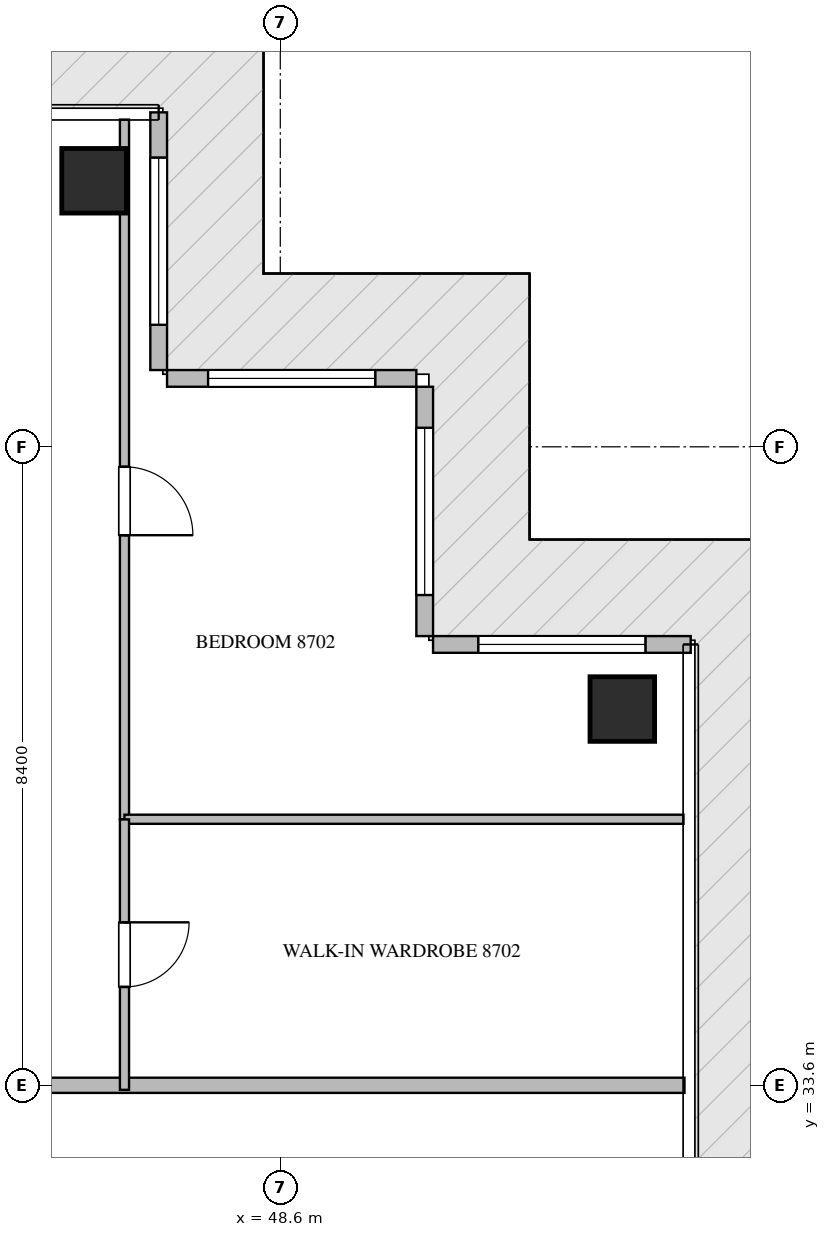
"""IFC4 building model, lengths in metres.
Left out: names, types, materials, properties, quantities, classifications, styles, units other than length and angle.
Written with IfcOpenShell. Run it as: python <this file> out.ifc"""

import sys

from ifc_helpers import new_model, si_unit, direction, frame, frame_2d, origin, origin_2d, place, context, subcontext, project, spatial, rectangle, extrude, source, transform, mapped, element, fill, save


model = new_model("IFC4")
c1 = context("Model", 3, precision=1e-05, world=origin(), true_north=direction((0.0, 1.0)))
c2 = subcontext(c1, "Body", "Model", "MODEL_VIEW")
j1 = project(units=[si_unit("LENGTHUNIT", "METRE"), si_unit("PLANEANGLEUNIT", "RADIAN")], contexts=[c1])
p1 = place(None, origin())
s1 = spatial("IfcSite", under=j1, at=p1, CompositionType="ELEMENT")
p2 = place(p1, origin())
s2 = spatial("IfcBuilding", under=s1, at=p2, CompositionType="ELEMENT")
p3 = place(p2, frame((0.0, 0.0, 353.85)))
s3 = spatial("IfcBuildingStorey", under=s2, at=p3, CompositionType="ELEMENT", Elevation=353.85)
m1 = source(origin(), c2, "Body", "SweptSolid", [
    extrude(rectangle(XDim=0.85, YDim=0.85, at=origin_2d()), origin(), (0.0, 0.0, 1.0), 5.8),
])
for number, where, z_axis, x_axis in (
    (1, (46.15, 45.5, -0.26), (0.0, 0.0, 1.0), (1.0, 0.0, 0.0)),
    (2, (53.1, 38.55, -0.26), (0.0, 0.0, 1.0), (1.0, 0.0, 0.0)),
):
    element("IfcColumn", number, at=place(p3, frame(where, z_axis=z_axis, x_axis=x_axis)), inside=s3, PredefinedType="COLUMN", context=c2, shape_type="MappedRepresentation", body=[
        mapped(m1, transform((0.0, 0.0, 0.0), scale=1.0)),
    ])
p4 = place(p3, frame((54.0, 39.4, 0.0), z_axis=(0.0, 0.0, 1.0), x_axis=(-1.0, 0.0, 0.0)))
e3 = element("IfcWall", 3, at=p4, inside=s3, PredefinedType="ELEMENTEDWALL", context=c2, shape_type="SweptSolid", body=[
    extrude(rectangle(XDim=3.39, YDim=0.22, at=frame_2d((1.695, 0.0))), origin(), (0.0, 0.0, 1.0), 5.525),
])
p5 = place(p4, frame((0.595, 0.0, 0.65)))
e4 = element("IfcOpeningElement", 4, at=p5, cuts=e3, PredefinedType="OPENING", context=c2, shape_type="SweptSolid", body=[
    extrude(rectangle(XDim=2.2, YDim=2.4, at=frame_2d((1.1, 1.2))), frame((0.0, 0.12, 0.0), z_axis=(0.0, -1.0, 0.0), x_axis=(1.0, 0.0, 0.0)), (0.0, 0.0, 1.0), 0.24),
])
p6 = place(p3, frame((50.5, 39.51, 0.0), z_axis=(0.0, 0.0, 1.0), x_axis=(0.0, 1.0, 0.0)))
e5 = element("IfcWall", 5, at=p6, inside=s3, PredefinedType="ELEMENTEDWALL", context=c2, shape_type="SweptSolid", body=[
    extrude(rectangle(XDim=3.28, YDim=0.22, at=frame_2d((1.64, 0.0))), origin(), (0.0, 0.0, 1.0), 5.525),
])
p7 = place(p6, frame((0.54, 0.0, 0.65)))
e6 = element("IfcOpeningElement", 6, at=p7, cuts=e5, PredefinedType="OPENING", context=c2, shape_type="SweptSolid", body=[
    extrude(rectangle(XDim=2.2, YDim=2.4, at=frame_2d((1.1, 1.2))), frame((0.0, 0.12, 0.0), z_axis=(0.0, -1.0, 0.0), x_axis=(1.0, 0.0, 0.0)), (0.0, 0.0, 1.0), 0.24),
])
p8 = place(p3, frame((50.39, 42.9, 0.0), z_axis=(0.0, 0.0, 1.0), x_axis=(-1.0, 0.0, 0.0)))
e7 = element("IfcWall", 7, at=p8, inside=s3, PredefinedType="ELEMENTEDWALL", context=c2, shape_type="SweptSolid", body=[
    extrude(rectangle(XDim=3.28, YDim=0.22, at=frame_2d((1.64, 0.0))), origin(), (0.0, 0.0, 1.0), 5.525),
])
p9 = place(p8, frame((0.54, 0.0, 0.65)))
e8 = element("IfcOpeningElement", 8, at=p9, cuts=e7, PredefinedType="OPENING", context=c2, shape_type="SweptSolid", body=[
    extrude(rectangle(XDim=2.2, YDim=2.4, at=frame_2d((1.1, 1.2))), frame((0.0, 0.12, 0.0), z_axis=(0.0, -1.0, 0.0), x_axis=(1.0, 0.0, 0.0)), (0.0, 0.0, 1.0), 0.24),
])
p10 = place(p3, frame((47.0, 43.01, 0.0), z_axis=(0.0, 0.0, 1.0), x_axis=(0.0, 1.0, 0.0)))
e9 = element("IfcWall", 9, at=p10, inside=s3, PredefinedType="ELEMENTEDWALL", context=c2, shape_type="SweptSolid", body=[
    extrude(rectangle(XDim=3.39, YDim=0.22, at=frame_2d((1.695, 0.0))), origin(), (0.0, 0.0, 1.0), 5.525),
])
p11 = place(p10, frame((0.595, 0.0, 0.65)))
e10 = element("IfcOpeningElement", 10, at=p11, cuts=e9, PredefinedType="OPENING", context=c2, shape_type="SweptSolid", body=[
    extrude(rectangle(XDim=2.2, YDim=2.4, at=frame_2d((1.1, 1.2))), frame((0.0, 0.12, 0.0), z_axis=(0.0, -1.0, 0.0), x_axis=(1.0, 0.0, 0.0)), (0.0, 0.0, 1.0), 0.24),
])
p12 = place(p3, frame((43.9, 33.6, 0.0), z_axis=(0.0, 0.0, 1.0), x_axis=(1.0, 0.0, 0.0)))
e11 = element("IfcWall", 11, at=p12, inside=s3, PredefinedType="PARTITIONING", context=c2, shape_type="SweptSolid", body=[
    extrude(rectangle(XDim=10.018, YDim=0.2, at=frame_2d((5.009, 0.0))), origin(), (0.0, 0.0, 1.0), 5.54),
])
p13 = place(p3, frame((46.55, 46.305, 0.0), z_axis=(0.0, 0.0, 1.0), x_axis=(0.0, -1.0, 0.0)))
e12 = element("IfcWall", 12, at=p13, inside=s3, PredefinedType="PARTITIONING", context=c2, shape_type="SweptSolid", body=[
    extrude(rectangle(XDim=9.205, YDim=0.12, at=frame_2d((4.603, 0.0))), origin(), (0.0, 0.0, 1.0), 5.54),
])
p14 = place(p13, frame((4.568, 0.0, 0.0)))
e13 = element("IfcOpeningElement", 13, at=p14, cuts=e12, PredefinedType="OPENING", context=c2, shape_type="SweptSolid", body=[
    extrude(rectangle(XDim=0.9, YDim=2.1, at=frame_2d((0.45, 1.05))), frame((0.0, 0.07, 0.0), z_axis=(0.0, -1.0, 0.0), x_axis=(1.0, 0.0, 0.0)), (0.0, 0.0, 1.0), 0.14),
])
p15 = place(p3, frame((46.55, 37.1, 0.0), z_axis=(0.0, 0.0, 1.0), x_axis=(1.0, 0.0, 0.0)))
e14 = element("IfcWall", 14, at=p15, inside=s3, PredefinedType="PARTITIONING", context=c2, shape_type="SweptSolid", body=[
    extrude(rectangle(XDim=7.355, YDim=0.12, at=frame_2d((3.677, 0.0))), origin(), (0.0, 0.0, 1.0), 5.54),
])
p16 = place(p3, frame((46.55, 37.098, 0.0), z_axis=(0.0, 0.0, 1.0), x_axis=(0.0, -1.0, 0.0)))
e15 = element("IfcWall", 15, at=p16, inside=s3, PredefinedType="PARTITIONING", context=c2, shape_type="SweptSolid", body=[
    extrude(rectangle(XDim=3.558, YDim=0.12, at=frame_2d((1.779, 0.0))), origin(), (0.0, 0.0, 1.0), 5.54),
])
p17 = place(p16, frame((1.354, 0.0, 0.0)))
e16 = element("IfcOpeningElement", 16, at=p17, cuts=e15, PredefinedType="OPENING", context=c2, shape_type="SweptSolid", body=[
    extrude(rectangle(XDim=0.85, YDim=2.1, at=frame_2d((0.425, 1.05))), frame((0.0, 0.07, 0.0), z_axis=(0.0, -1.0, 0.0), x_axis=(1.0, 0.0, 0.0)), (0.0, 0.0, 1.0), 0.14),
])
m2 = source(origin(), c2, "Body", "SweptSolid", [
    extrude(rectangle(XDim=2.2, YDim=2.4, at=frame_2d((1.1, 1.2))), frame((0.0, 0.03, 0.0), z_axis=(0.0, -1.0, 0.0), x_axis=(1.0, 0.0, 0.0)), (0.0, 0.0, 1.0), 0.06),
])
p18 = place(p5, origin())
e17 = element("IfcWindow", 17, at=p18, inside=s3, PartitioningType="SINGLE_PANEL", PredefinedType="WINDOW", context=c2, shape_type="MappedRepresentation", body=[
    mapped(m2, transform((0.0, 0.0, 0.0), scale=1.0)),
])
fill(e4, e17)
p19 = place(p7, origin())
e18 = element("IfcWindow", 18, at=p19, inside=s3, PartitioningType="SINGLE_PANEL", PredefinedType="WINDOW", context=c2, shape_type="MappedRepresentation", body=[
    mapped(m2, transform((0.0, 0.0, 0.0), scale=1.0)),
])
fill(e6, e18)
p20 = place(p9, origin())
e19 = element("IfcWindow", 19, at=p20, inside=s3, PartitioningType="SINGLE_PANEL", PredefinedType="WINDOW", context=c2, shape_type="MappedRepresentation", body=[
    mapped(m2, transform((0.0, 0.0, 0.0), scale=1.0)),
])
fill(e8, e19)
p21 = place(p11, origin())
e20 = element("IfcWindow", 20, at=p21, inside=s3, PartitioningType="SINGLE_PANEL", PredefinedType="WINDOW", context=c2, shape_type="MappedRepresentation", body=[
    mapped(m2, transform((0.0, 0.0, 0.0), scale=1.0)),
])
fill(e10, e20)
m3 = source(origin(), c2, "Body", "SweptSolid", [
    extrude(rectangle(XDim=0.9, YDim=2.1, at=frame_2d((0.45, 1.05))), frame((0.0, 0.025, 0.0), z_axis=(0.0, -1.0, 0.0), x_axis=(1.0, 0.0, 0.0)), (0.0, 0.0, 1.0), 0.05),
])
p22 = place(p14, origin())
e21 = element("IfcDoor", 21, at=p22, inside=s3, OperationType="SINGLE_SWING_RIGHT", PredefinedType="DOOR", context=c2, shape_type="MappedRepresentation", body=[
    mapped(m3, transform((0.0, 0.0, 0.0), scale=1.0)),
])
fill(e13, e21)
m4 = source(origin(), c2, "Body", "SweptSolid", [
    extrude(rectangle(XDim=0.85, YDim=2.1, at=frame_2d((0.425, 1.05))), frame((0.0, 0.025, 0.0), z_axis=(0.0, -1.0, 0.0), x_axis=(1.0, 0.0, 0.0)), (0.0, 0.0, 1.0), 0.05),
])
p23 = place(p17, origin())
e22 = element("IfcDoor", 22, at=p23, inside=s3, OperationType="SINGLE_SWING_LEFT", PredefinedType="DOOR", context=c2, shape_type="MappedRepresentation", body=[
    mapped(m4, transform((0.0, 0.0, 0.0), scale=1.0)),
])
fill(e16, e22)
save(model, sys.argv[1])
